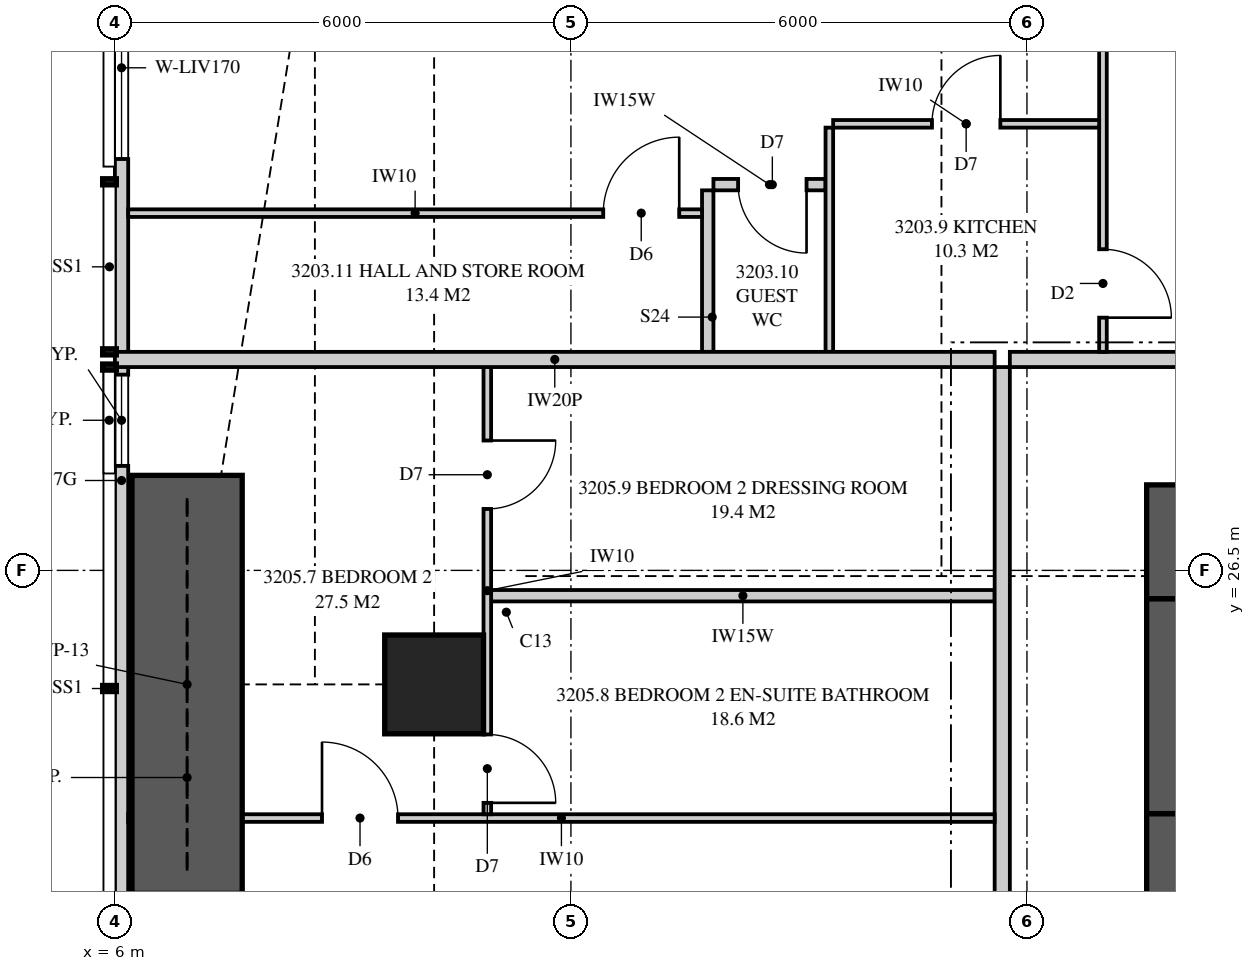
"""IFC4 building model, lengths in metres.
Left out: names, types, materials, properties, quantities, classifications, styles, units other than length and angle.
Written with IfcOpenShell. Run it as: python <this file> out.ifc"""

import sys

from ifc_helpers import new_model, si_unit, direction, frame, frame_2d, origin, origin_2d, place, context, subcontext, project, spatial, polyline, rectangle, outline, extrude, element, fill, save


model = new_model("IFC4")
c1 = context("Model", 3, precision=1e-05, world=origin(), true_north=direction((0.0, 1.0)))
c2 = subcontext(c1, "Body", "Model", "MODEL_VIEW")
j1 = project(units=[si_unit("LENGTHUNIT", "METRE"), si_unit("PLANEANGLEUNIT", "RADIAN")], contexts=[c1])
p1 = place(None, origin())
s1 = spatial("IfcSite", under=j1, at=p1, CompositionType="ELEMENT")
p2 = place(p1, origin())
s2 = spatial("IfcBuilding", under=s1, at=p2, CompositionType="ELEMENT")
p3 = place(p2, frame((0.0, 0.0, 118.25)))
s3 = spatial("IfcBuildingStorey", under=s2, at=p3, CompositionType="ELEMENT", Elevation=118.25)
p4 = place(p3, frame((10.2, 25.0, 0.0), z_axis=(0.0, 0.0, 1.0), x_axis=(1.0, 0.0, 0.0)))
e1 = element("IfcColumn", 1, at=p4, inside=s3, PredefinedType="COLUMN", context=c2, shape_type="SweptSolid", body=[
    extrude(rectangle(XDim=1.3, YDim=1.3, at=origin_2d()), origin(), (0.0, 0.0, 1.0), 3.35),
])
p5 = place(p3, frame((26.0, 26.875, 0.0), z_axis=(0.0, 0.0, 1.0), x_axis=(-1.0, 0.0, 0.0)))
e2 = element("IfcWall", 2, at=p5, inside=s3, PredefinedType="SHEAR", context=c2, shape_type="SweptSolid", body=[
    extrude(rectangle(XDim=6.425, YDim=1.5, at=frame_2d((3.212, 0.0))), origin(), (0.0, 0.0, 1.0), 3.35),
])
p6 = place(p5, frame((0.825, 0.0, 0.0)))
e3 = element("IfcOpeningElement", 3, at=p6, cuts=e2, PredefinedType="OPENING", context=c2, shape_type="SweptSolid", body=[
    extrude(rectangle(XDim=0.75, YDim=2.1, at=frame_2d((0.375, 1.05))), frame((0.0, 0.76, 0.0), z_axis=(0.0, -1.0, 0.0), x_axis=(1.0, 0.0, 0.0)), (0.0, 0.0, 1.0), 1.52),
])
p7 = place(p3, frame((20.0, 26.125, 0.0), z_axis=(0.0, 0.0, 1.0), x_axis=(0.0, -1.0, 0.0)))
e4 = element("IfcWall", 4, at=p7, inside=s3, PredefinedType="SHEAR", context=c2, shape_type="SweptSolid", body=[
    extrude(rectangle(XDim=2.825, YDim=0.85, at=frame_2d((1.413, 0.0))), origin(), (0.0, 0.0, 1.0), 3.35),
])
p8 = place(p3, frame((20.0, 23.3, 0.0), z_axis=(0.0, 0.0, 1.0), x_axis=(0.0, -1.0, 0.0)))
e5 = element("IfcWall", 5, at=p8, inside=s3, PredefinedType="SHEAR", context=c2, shape_type="SweptSolid", body=[
    extrude(rectangle(XDim=5.6, YDim=0.85, at=frame_2d((2.8, 0.0))), origin(), (0.0, 0.0, 1.0), 3.35),
])
p9 = place(p8, frame((3.4, 0.0, 0.0)))
e6 = element("IfcOpeningElement", 6, at=p9, cuts=e5, PredefinedType="OPENING", context=c2, shape_type="SweptSolid", body=[
    extrude(rectangle(XDim=1.2, YDim=2.2, at=frame_2d((0.6, 1.1))), frame((0.0, 0.435, 0.0), z_axis=(0.0, -1.0, 0.0), x_axis=(1.0, 0.0, 0.0)), (0.0, 0.0, 1.0), 0.87),
])
p10 = place(p3, frame((6.087, 34.949, 0.0), z_axis=(0.0, 0.0, 1.0), x_axis=(0.0, -1.0, 0.0)))
e7 = element("IfcWall", 7, at=p10, inside=s3, PredefinedType="SOLIDWALL", context=c2, shape_type="SweptSolid", body=[
    extrude(outline(polyline([(0.0, 0.0), (14.532, 0.0), (14.532, 2.15), (9.949, 2.15), (9.949, 3.11), (9.823, 3.11), (9.823, 2.15), (9.73, 2.15), (9.73, 3.11), (0.0, 3.11), (0.0, 0.0)])), frame((0.0, 0.087, 0.0), z_axis=(0.0, -1.0, 0.0), x_axis=(1.0, 0.0, 0.0)), (0.0, 0.0, 1.0), 0.175),
])
p11 = place(p10, frame((0.636, 0.0, 0.4)))
e8 = element("IfcOpeningElement", 8, at=p11, cuts=e7, PredefinedType="OPENING", context=c2, shape_type="SweptSolid", body=[
    extrude(rectangle(XDim=2.4, YDim=1.7, at=frame_2d((1.2, 0.85))), frame((0.0, 0.097, 0.0), z_axis=(0.0, -1.0, 0.0), x_axis=(1.0, 0.0, 0.0)), (0.0, 0.0, 1.0), 0.195),
])
p12 = place(p10, frame((5.874, 0.0, 0.4)))
e9 = element("IfcOpeningElement", 9, at=p12, cuts=e7, PredefinedType="OPENING", context=c2, shape_type="SweptSolid", body=[
    extrude(rectangle(XDim=1.2, YDim=1.7, at=frame_2d((0.6, 0.85))), frame((0.0, 0.097, 0.0), z_axis=(0.0, -1.0, 0.0), x_axis=(1.0, 0.0, 0.0)), (0.0, 0.0, 1.0), 0.195),
])
p13 = place(p3, frame((17.775, 29.275, 0.0), z_axis=(0.0, 0.0, 1.0), x_axis=(1.0, 0.0, 0.0)))
e10 = element("IfcWall", 10, at=p13, inside=s3, PredefinedType="PARTITIONING", context=c2, shape_type="SweptSolid", body=[
    extrude(outline(polyline([(0.0, 0.0), (18.925, 0.0), (18.925, 3.11), (10.312, 3.11), (10.312, 2.541), (9.638, 2.541), (9.638, 3.11), (0.0, 3.11), (0.0, 0.0)])), frame((0.0, 0.1, 0.0), z_axis=(0.0, -1.0, 0.0), x_axis=(1.0, 0.0, 0.0)), (0.0, 0.0, 1.0), 0.2),
])
p14 = place(p13, frame((3.125, 0.0, 0.0)))
e11 = element("IfcOpeningElement", 11, at=p14, cuts=e10, PredefinedType="OPENING", context=c2, shape_type="SweptSolid", body=[
    extrude(rectangle(XDim=1.05, YDim=2.2, at=frame_2d((0.525, 1.1))), frame((0.0, 0.11, 0.0), z_axis=(0.0, -1.0, 0.0), x_axis=(1.0, 0.0, 0.0)), (0.0, 0.0, 1.0), 0.22),
])
p15 = place(p3, frame((19.0, 37.825, 0.0), z_axis=(0.0, 0.0, 1.0), x_axis=(0.0, -1.0, 0.0)))
e12 = element("IfcWall", 12, at=p15, inside=s3, PredefinedType="PARTITIONING", context=c2, shape_type="SweptSolid", body=[
    extrude(outline(polyline([(0.529, 2.15), (0.0, 2.15), (0.0, 0.0), (0.529, 0.0), (0.529, 0.017), (1.021, 0.017), (1.021, 0.0), (8.45, 0.0), (8.45, 3.11), (1.635, 3.11), (1.635, 2.15), (1.021, 2.15), (1.021, 2.133), (0.529, 2.133), (0.529, 2.15)])), frame((0.0, 0.05, 0.0), z_axis=(0.0, -1.0, 0.0), x_axis=(1.0, 0.0, 0.0)), (0.0, 0.0, 1.0), 0.1),
])
p16 = place(p15, frame((7.1, 0.0, 0.0)))
e13 = element("IfcOpeningElement", 13, at=p16, cuts=e12, PredefinedType="OPENING", context=c2, shape_type="SweptSolid", body=[
    extrude(rectangle(XDim=0.9, YDim=2.1, at=frame_2d((0.45, 1.05))), frame((0.0, 0.06, 0.0), z_axis=(0.0, -1.0, 0.0), x_axis=(1.0, 0.0, 0.0)), (0.0, 0.0, 1.0), 0.12),
])
p17 = place(p3, frame((15.45, 32.375, 0.0), z_axis=(0.0, 0.0, 1.0), x_axis=(1.0, 0.0, 0.0)))
e14 = element("IfcWall", 14, at=p17, inside=s3, PredefinedType="PARTITIONING", context=c2, shape_type="SweptSolid", body=[
    extrude(outline(polyline([(0.0, 0.0), (3.5, 0.0), (3.5, 3.11), (1.712, 3.11), (1.712, 2.541), (1.138, 2.541), (1.138, 3.11), (0.0, 3.11), (0.0, 0.0)])), frame((0.0, 0.05, 0.0), z_axis=(0.0, -1.0, 0.0), x_axis=(1.0, 0.0, 0.0)), (0.0, 0.0, 1.0), 0.1),
])
p18 = place(p17, frame((1.3, 0.0, 0.0)))
e15 = element("IfcOpeningElement", 15, at=p18, cuts=e14, PredefinedType="OPENING", context=c2, shape_type="SweptSolid", body=[
    extrude(rectangle(XDim=0.9, YDim=2.1, at=frame_2d((0.45, 1.05))), frame((0.0, 0.06, 0.0), z_axis=(0.0, -1.0, 0.0), x_axis=(1.0, 0.0, 0.0)), (0.0, 0.0, 1.0), 0.12),
])
p19 = place(p3, frame((15.4, 32.325, 0.0), z_axis=(0.0, 0.0, 1.0), x_axis=(0.0, -1.0, 0.0)))
e16 = element("IfcWall", 16, at=p19, inside=s3, PredefinedType="PARTITIONING", context=c2, shape_type="SweptSolid", body=[
    extrude(rectangle(XDim=2.95, YDim=0.1, at=frame_2d((1.475, 0.0))), origin(), (0.0, 0.0, 1.0), 3.11),
])
p20 = place(p3, frame((13.875, 31.575, 0.0), z_axis=(0.0, 0.0, 1.0), x_axis=(1.0, 0.0, 0.0)))
e17 = element("IfcWall", 17, at=p20, inside=s3, PredefinedType="PLUMBINGWALL", context=c2, shape_type="SweptSolid", body=[
    extrude(rectangle(XDim=1.475, YDim=0.15, at=frame_2d((0.738, 0.0))), origin(), (0.0, 0.0, 1.0), 3.11),
])
p21 = place(p20, frame((0.325, 0.0, 0.0)))
e18 = element("IfcOpeningElement", 18, at=p21, cuts=e17, PredefinedType="OPENING", context=c2, shape_type="SweptSolid", body=[
    extrude(rectangle(XDim=0.9, YDim=2.1, at=frame_2d((0.45, 1.05))), frame((0.0, 0.085, 0.0), z_axis=(0.0, -1.0, 0.0), x_axis=(1.0, 0.0, 0.0)), (0.0, 0.0, 1.0), 0.17),
])
p22 = place(p3, frame((13.8, 31.5, 0.0), z_axis=(0.0, 0.0, 1.0), x_axis=(0.0, -1.0, 0.0)))
e19 = element("IfcWall", 19, at=p22, inside=s3, PredefinedType="PLUMBINGWALL", context=c2, shape_type="SweptSolid", body=[
    extrude(rectangle(XDim=2.125, YDim=0.15, at=frame_2d((1.062, 0.0))), origin(), (0.0, 0.0, 1.0), 3.11),
])
p23 = place(p3, frame((6.175, 31.2, 0.0), z_axis=(0.0, 0.0, 1.0), x_axis=(1.0, 0.0, 0.0)))
e20 = element("IfcWall", 20, at=p23, inside=s3, PredefinedType="PARTITIONING", context=c2, shape_type="SweptSolid", body=[
    extrude(outline(polyline([(0.0, 0.0), (7.55, 0.0), (7.55, 3.11), (5.285, 3.11), (5.285, 2.51), (2.765, 2.51), (2.765, 3.11), (2.744, 3.11), (2.744, 2.541), (2.652, 2.541), (2.652, 2.15), (0.909, 2.15), (0.909, 3.11), (0.0, 3.11), (0.0, 0.0)])), frame((0.0, 0.05, 0.0), z_axis=(0.0, -1.0, 0.0), x_axis=(1.0, 0.0, 0.0)), (0.0, 0.0, 1.0), 0.1),
])
p24 = place(p23, frame((6.25, 0.0, 0.0)))
e21 = element("IfcOpeningElement", 21, at=p24, cuts=e20, PredefinedType="OPENING", context=c2, shape_type="SweptSolid", body=[
    extrude(rectangle(XDim=1.0, YDim=2.1, at=frame_2d((0.5, 1.05))), frame((0.0, 0.06, 0.0), z_axis=(0.0, -1.0, 0.0), x_axis=(1.0, 0.0, 0.0)), (0.0, 0.0, 1.0), 0.12),
])
p25 = place(p3, frame((6.0, 29.275, 0.0), z_axis=(0.0, 0.0, 1.0), x_axis=(1.0, 0.0, 0.0)))
e22 = element("IfcWall", 22, at=p25, inside=s3, PredefinedType="PARTITIONING", context=c2, shape_type="SweptSolid", body=[
    extrude(outline(polyline([(0.0, 0.0), (11.575, 0.0), (11.575, 3.11), (11.212, 3.11), (11.212, 2.541), (10.538, 2.541), (10.538, 3.11), (5.51, 3.11), (5.51, 2.51), (2.969, 2.51), (2.969, 2.541), (2.565, 2.541), (2.565, 2.15), (0.721, 2.15), (0.721, 3.11), (0.0, 3.11), (0.0, 0.0)])), frame((0.0, 0.1, 0.0), z_axis=(0.0, -1.0, 0.0), x_axis=(1.0, 0.0, 0.0)), (0.0, 0.0, 1.0), 0.2),
])
p26 = place(p3, frame((6.175, 23.242, 0.0), z_axis=(0.0, 0.0, 1.0), x_axis=(1.0, 0.0, 0.0)))
e23 = element("IfcWall", 23, at=p26, inside=s3, PredefinedType="PARTITIONING", context=c2, shape_type="SweptSolid", body=[
    extrude(outline(polyline([(0.529, 2.15), (0.0, 2.15), (0.0, 0.0), (0.529, 0.0), (0.529, 0.268), (1.021, 0.268), (1.021, 0.0), (11.4, 0.0), (11.4, 3.11), (5.285, 3.11), (5.285, 2.51), (2.765, 2.51), (2.765, 3.11), (1.635, 3.11), (1.635, 2.15), (1.021, 2.15), (1.021, 1.882), (0.529, 1.882), (0.529, 2.15)])), frame((0.0, 0.05, 0.0), z_axis=(0.0, -1.0, 0.0), x_axis=(1.0, 0.0, 0.0)), (0.0, 0.0, 1.0), 0.1),
])
p27 = place(p26, frame((2.55, 0.0, 0.0)))
e24 = element("IfcOpeningElement", 24, at=p27, cuts=e23, PredefinedType="OPENING", context=c2, shape_type="SweptSolid", body=[
    extrude(rectangle(XDim=1.0, YDim=2.1, at=frame_2d((0.5, 1.05))), frame((0.0, 0.06, 0.0), z_axis=(0.0, -1.0, 0.0), x_axis=(1.0, 0.0, 0.0)), (0.0, 0.0, 1.0), 0.12),
])
p28 = place(p3, frame((17.675, 19.7, 0.0), z_axis=(0.0, 0.0, 1.0), x_axis=(0.0, 1.0, 0.0)))
e25 = element("IfcWall", 25, at=p28, inside=s3, PredefinedType="PARTITIONING", context=c2, shape_type="SweptSolid", body=[
    extrude(outline(polyline([(0.0, 0.0), (9.475, 0.0), (9.475, 3.11), (7.062, 3.11), (7.062, 2.541), (6.388, 2.541), (6.388, 3.11), (0.0, 3.11), (0.0, 0.0)])), frame((0.0, 0.1, 0.0), z_axis=(0.0, -1.0, 0.0), x_axis=(1.0, 0.0, 0.0)), (0.0, 0.0, 1.0), 0.2),
])
p29 = place(p3, frame((10.9, 23.292, 0.0), z_axis=(0.0, 0.0, 1.0), x_axis=(0.0, 1.0, 0.0)))
e26 = element("IfcWall", 26, at=p29, inside=s3, PredefinedType="PARTITIONING", context=c2, shape_type="SweptSolid", body=[
    extrude(outline(polyline([(0.0, 0.0), (5.883, 0.0), (5.883, 3.11), (5.883, 2.51), (1.768, 2.51), (0.0, 2.51), (0.0, 3.11), (0.0, 0.0)])), frame((0.0, 0.05, 0.0), z_axis=(0.0, -1.0, 0.0), x_axis=(1.0, 0.0, 0.0)), (0.0, 0.0, 1.0), 0.1),
])
p30 = place(p29, frame((0.15, 0.0, 0.0)))
e27 = element("IfcOpeningElement", 27, at=p30, cuts=e26, PredefinedType="OPENING", context=c2, shape_type="SweptSolid", body=[
    extrude(rectangle(XDim=0.9, YDim=2.1, at=frame_2d((0.45, 1.05))), frame((0.0, 0.06, 0.0), z_axis=(0.0, -1.0, 0.0), x_axis=(1.0, 0.0, 0.0)), (0.0, 0.0, 1.0), 0.12),
])
p31 = place(p29, frame((4.017, 0.0, 0.0)))
e28 = element("IfcOpeningElement", 28, at=p31, cuts=e26, PredefinedType="OPENING", context=c2, shape_type="SweptSolid", body=[
    extrude(rectangle(XDim=0.9, YDim=2.1, at=frame_2d((0.45, 1.05))), frame((0.0, 0.06, 0.0), z_axis=(0.0, -1.0, 0.0), x_axis=(1.0, 0.0, 0.0)), (0.0, 0.0, 1.0), 0.12),
])
p32 = place(p3, frame((10.95, 26.167, 0.0), z_axis=(0.0, 0.0, 1.0), x_axis=(1.0, 0.0, 0.0)))
e29 = element("IfcWall", 29, at=p32, inside=s3, PredefinedType="PLUMBINGWALL", context=c2, shape_type="SweptSolid", body=[
    extrude(outline(polyline([(0.0, 0.0), (6.625, 0.0), (6.625, 3.11), (6.625, 2.541), (0.535, 2.541), (0.535, 2.51), (0.0, 2.51), (0.0, 3.11), (0.0, 0.0)])), frame((0.0, 0.075, 0.0), z_axis=(0.0, -1.0, 0.0), x_axis=(1.0, 0.0, 0.0)), (0.0, 0.0, 1.0), 0.15),
])
p33 = place(p3, frame((6.95, 22.25, 0.0), z_axis=(0.0, 0.0, 1.0), x_axis=(0.0, 1.0, 0.0)))
e30 = element("IfcWall", 30, at=p33, inside=s3, PredefinedType="SHEAR", context=c2, shape_type="SweptSolid", body=[
    extrude(rectangle(XDim=5.5, YDim=1.45, at=frame_2d((2.75, 0.0))), origin(), (0.0, 0.0, 1.0), 3.35),
])
p34 = place(p11, origin())
e31 = element("IfcWindow", 31, at=p34, inside=s3, PartitioningType="SINGLE_PANEL", PredefinedType="WINDOW", context=c2, shape_type="SweptSolid", body=[
    extrude(rectangle(XDim=2.4, YDim=1.7, at=frame_2d((1.2, 0.85))), frame((0.0, 0.03, 0.0), z_axis=(0.0, -1.0, 0.0), x_axis=(1.0, 0.0, 0.0)), (0.0, 0.0, 1.0), 0.06),
])
fill(e8, e31)
p35 = place(p12, origin())
e32 = element("IfcWindow", 32, at=p35, inside=s3, PartitioningType="SINGLE_PANEL", PredefinedType="WINDOW", context=c2, shape_type="SweptSolid", body=[
    extrude(rectangle(XDim=1.2, YDim=1.7, at=frame_2d((0.6, 0.85))), frame((0.0, 0.03, 0.0), z_axis=(0.0, -1.0, 0.0), x_axis=(1.0, 0.0, 0.0)), (0.0, 0.0, 1.0), 0.06),
])
fill(e9, e32)
p36 = place(p16, origin())
e33 = element("IfcDoor", 33, at=p36, inside=s3, OperationType="SINGLE_SWING_RIGHT", PredefinedType="DOOR", context=c2, shape_type="SweptSolid", body=[
    extrude(rectangle(XDim=0.9, YDim=2.1, at=frame_2d((0.45, 1.05))), frame((0.0, 0.025, 0.0), z_axis=(0.0, -1.0, 0.0), x_axis=(1.0, 0.0, 0.0)), (0.0, 0.0, 1.0), 0.05),
])
fill(e13, e33)
p37 = place(p18, origin())
e34 = element("IfcDoor", 34, at=p37, inside=s3, OperationType="SINGLE_SWING_RIGHT", PredefinedType="DOOR", context=c2, shape_type="SweptSolid", body=[
    extrude(rectangle(XDim=0.9, YDim=2.1, at=frame_2d((0.45, 1.05))), frame((0.0, 0.025, 0.0), z_axis=(0.0, -1.0, 0.0), x_axis=(1.0, 0.0, 0.0)), (0.0, 0.0, 1.0), 0.05),
])
fill(e15, e34)
p38 = place(p21, frame((0.9, 0.0, 0.0), z_axis=(0.0, 0.0, 1.0), x_axis=(-1.0, 0.0, 0.0)))
e35 = element("IfcDoor", 35, at=p38, inside=s3, OperationType="SINGLE_SWING_LEFT", PredefinedType="DOOR", context=c2, shape_type="SweptSolid", body=[
    extrude(rectangle(XDim=0.9, YDim=2.1, at=frame_2d((0.45, 1.05))), frame((0.0, 0.025, 0.0), z_axis=(0.0, -1.0, 0.0), x_axis=(1.0, 0.0, 0.0)), (0.0, 0.0, 1.0), 0.05),
])
fill(e18, e35)
p39 = place(p24, origin())
e36 = element("IfcDoor", 36, at=p39, inside=s3, OperationType="SINGLE_SWING_RIGHT", PredefinedType="DOOR", context=c2, shape_type="SweptSolid", body=[
    extrude(rectangle(XDim=1.0, YDim=2.1, at=frame_2d((0.5, 1.05))), frame((0.0, 0.025, 0.0), z_axis=(0.0, -1.0, 0.0), x_axis=(1.0, 0.0, 0.0)), (0.0, 0.0, 1.0), 0.05),
])
fill(e21, e36)
p40 = place(p27, origin())
e37 = element("IfcDoor", 37, at=p40, inside=s3, OperationType="SINGLE_SWING_LEFT", PredefinedType="DOOR", context=c2, shape_type="SweptSolid", body=[
    extrude(rectangle(XDim=1.0, YDim=2.1, at=frame_2d((0.5, 1.05))), frame((0.0, 0.025, 0.0), z_axis=(0.0, -1.0, 0.0), x_axis=(1.0, 0.0, 0.0)), (0.0, 0.0, 1.0), 0.05),
])
fill(e24, e37)
p41 = place(p30, frame((0.9, 0.0, 0.0), z_axis=(0.0, 0.0, 1.0), x_axis=(-1.0, 0.0, 0.0)))
e38 = element("IfcDoor", 38, at=p41, inside=s3, OperationType="SINGLE_SWING_RIGHT", PredefinedType="DOOR", context=c2, shape_type="SweptSolid", body=[
    extrude(rectangle(XDim=0.9, YDim=2.1, at=frame_2d((0.45, 1.05))), frame((0.0, 0.025, 0.0), z_axis=(0.0, -1.0, 0.0), x_axis=(1.0, 0.0, 0.0)), (0.0, 0.0, 1.0), 0.05),
])
fill(e27, e38)
p42 = place(p31, frame((0.9, 0.0, 0.0), z_axis=(0.0, 0.0, 1.0), x_axis=(-1.0, 0.0, 0.0)))
e39 = element("IfcDoor", 39, at=p42, inside=s3, OperationType="SINGLE_SWING_LEFT", PredefinedType="DOOR", context=c2, shape_type="SweptSolid", body=[
    extrude(rectangle(XDim=0.9, YDim=2.1, at=frame_2d((0.45, 1.05))), frame((0.0, 0.025, 0.0), z_axis=(0.0, -1.0, 0.0), x_axis=(1.0, 0.0, 0.0)), (0.0, 0.0, 1.0), 0.05),
])
fill(e28, e39)
save(model, sys.argv[1])
